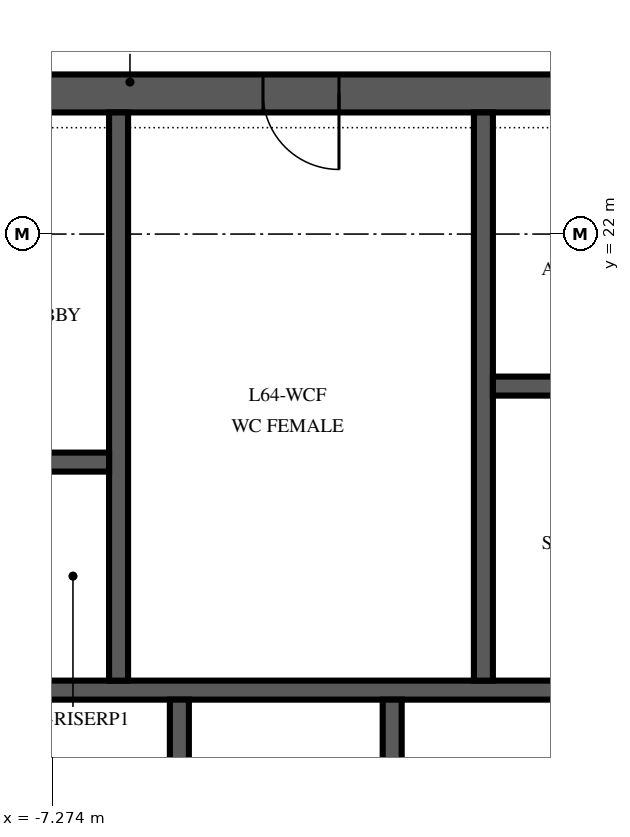
"""IFC4 building model, lengths in metres.
Left out: names, types, materials, properties, quantities, classifications, styles, units other than length and angle.
Written with IfcOpenShell. Run it as: python <this file> out.ifc"""

import sys

from ifc_helpers import new_model, si_unit, direction, frame, frame_2d, origin, place, context, subcontext, project, spatial, rectangle, extrude, element, fill, save


model = new_model("IFC4")
c1 = context("Model", 3, precision=1e-05, world=origin(), true_north=direction((0.0, 1.0)))
c2 = subcontext(c1, "Body", "Model", "MODEL_VIEW")
j1 = project(units=[si_unit("LENGTHUNIT", "METRE"), si_unit("PLANEANGLEUNIT", "RADIAN")], contexts=[c1])
p1 = place(None, origin())
s1 = spatial("IfcSite", under=j1, at=p1, CompositionType="ELEMENT")
p2 = place(p1, origin())
s2 = spatial("IfcBuilding", under=s1, at=p2, CompositionType="ELEMENT")
p3 = place(p2, frame((0.0, 0.0, 276.0)))
s3 = spatial("IfcBuildingStorey", under=s2, at=p3, CompositionType="ELEMENT", Elevation=276.0)
p4 = place(p3, frame((13.85, 23.85, 0.0), z_axis=(0.0, 0.0, 1.0), x_axis=(-1.0, 0.0, 0.0)))
e1 = element("IfcWall", 1, at=p4, inside=s3, PredefinedType="SHEAR", context=c2, shape_type="SweptSolid", body=[
    extrude(rectangle(XDim=27.7, YDim=0.5, at=frame_2d((13.85, 0.0))), origin(), (0.0, 0.0, 1.0), 4.0),
])
p5 = place(p4, frame((21.75, 0.0, 0.0)))
e2 = element("IfcOpeningElement", 2, at=p5, cuts=e1, PredefinedType="OPENING", context=c2, shape_type="SweptSolid", body=[
    extrude(rectangle(XDim=1.0, YDim=2.1, at=frame_2d((0.5, 1.05))), frame((0.0, 0.265, 0.0), z_axis=(0.0, -1.0, 0.0), x_axis=(1.0, 0.0, 0.0)), (0.0, 0.0, 1.0), 0.53),
])
p6 = place(p4, frame((4.95, 0.0, 0.0)))
e3 = element("IfcOpeningElement", 3, at=p6, cuts=e1, PredefinedType="OPENING", context=c2, shape_type="SweptSolid", body=[
    extrude(rectangle(XDim=1.0, YDim=2.1, at=frame_2d((0.5, 1.05))), frame((0.0, 0.265, 0.0), z_axis=(0.0, -1.0, 0.0), x_axis=(1.0, 0.0, 0.0)), (0.0, 0.0, 1.0), 0.53),
])
p7 = place(p4, frame((17.35, 0.0, 0.0)))
e4 = element("IfcOpeningElement", 4, at=p7, cuts=e1, PredefinedType="OPENING", context=c2, shape_type="SweptSolid", body=[
    extrude(rectangle(XDim=1.0, YDim=2.1, at=frame_2d((0.5, 1.05))), frame((0.0, 0.265, 0.0), z_axis=(0.0, -1.0, 0.0), x_axis=(1.0, 0.0, 0.0)), (0.0, 0.0, 1.0), 0.53),
])
p8 = place(p4, frame((13.35, 0.0, 0.0)))
e5 = element("IfcOpeningElement", 5, at=p8, cuts=e1, PredefinedType="OPENING", context=c2, shape_type="SweptSolid", body=[
    extrude(rectangle(XDim=1.0, YDim=2.1, at=frame_2d((0.5, 1.05))), frame((0.0, 0.265, 0.0), z_axis=(0.0, -1.0, 0.0), x_axis=(1.0, 0.0, 0.0)), (0.0, 0.0, 1.0), 0.53),
])
p9 = place(p4, frame((9.35, 0.0, 0.0)))
e6 = element("IfcOpeningElement", 6, at=p9, cuts=e1, PredefinedType="OPENING", context=c2, shape_type="SweptSolid", body=[
    extrude(rectangle(XDim=1.0, YDim=2.1, at=frame_2d((0.5, 1.05))), frame((0.0, 0.265, 0.0), z_axis=(0.0, -1.0, 0.0), x_axis=(1.0, 0.0, 0.0)), (0.0, 0.0, 1.0), 0.53),
])
p10 = place(p3, frame((-13.6, 16.0, 0.0), z_axis=(0.0, 0.0, 1.0), x_axis=(1.0, 0.0, 0.0)))
e7 = element("IfcWall", 7, at=p10, inside=s3, PredefinedType="SHEAR", context=c2, shape_type="SweptSolid", body=[
    extrude(rectangle(XDim=27.2, YDim=0.25, at=frame_2d((13.6, 0.0))), origin(), (0.0, 0.0, 1.0), 4.0),
])
for number, where, z_axis, x_axis in (
    (8, (-5.6, 13.125, 0.0), (0.0, 0.0, 1.0), (0.0, 1.0, 0.0)),
    (9, (-2.8, 13.125, 0.0), (0.0, 0.0, 1.0), (0.0, 1.0, 0.0)),
):
    element("IfcWall", number, at=place(p3, frame(where, z_axis=z_axis, x_axis=x_axis)), inside=s3, PredefinedType="SHEAR", context=c2, shape_type="SweptSolid", body=[
        extrude(rectangle(XDim=2.75, YDim=0.25, at=frame_2d((1.375, 0.0))), origin(), (0.0, 0.0, 1.0), 4.0),
    ])
for number, where, z_axis, x_axis in (
    (10, (-6.4, 16.125, 0.0), (0.0, 0.0, 1.0), (0.0, 1.0, 0.0)),
    (11, (-1.6, 16.125, 0.0), (0.0, 0.0, 1.0), (0.0, 1.0, 0.0)),
):
    element("IfcWall", number, at=place(p3, frame(where, z_axis=z_axis, x_axis=x_axis)), inside=s3, PredefinedType="SHEAR", context=c2, shape_type="SweptSolid", body=[
        extrude(rectangle(XDim=7.475, YDim=0.25, at=frame_2d((3.738, 0.0))), origin(), (0.0, 0.0, 1.0), 4.0),
    ])
p11 = place(p3, frame((-10.275, 19.0, 0.0), z_axis=(0.0, 0.0, 1.0), x_axis=(1.0, 0.0, 0.0)))
e12 = element("IfcWall", 12, at=p11, inside=s3, PredefinedType="SHEAR", context=c2, shape_type="SweptSolid", body=[
    extrude(rectangle(XDim=3.75, YDim=0.25, at=frame_2d((1.875, 0.0))), origin(), (0.0, 0.0, 1.0), 4.0),
])
p12 = place(p11, frame((0.725, 0.0, 0.0)))
e13 = element("IfcOpeningElement", 13, at=p12, cuts=e12, PredefinedType="OPENING", context=c2, shape_type="SweptSolid", body=[
    extrude(rectangle(XDim=1.1, YDim=2.1, at=frame_2d((0.55, 1.05))), frame((0.0, 0.14, 0.0), z_axis=(0.0, -1.0, 0.0), x_axis=(1.0, 0.0, 0.0)), (0.0, 0.0, 1.0), 0.28),
])
p13 = place(p3, frame((-1.475, 20.0, 0.0), z_axis=(0.0, 0.0, 1.0), x_axis=(1.0, 0.0, 0.0)))
e14 = element("IfcWall", 14, at=p13, inside=s3, PredefinedType="SHEAR", context=c2, shape_type="SweptSolid", body=[
    extrude(rectangle(XDim=2.95, YDim=0.25, at=frame_2d((1.475, 0.0))), origin(), (0.0, 0.0, 1.0), 4.0),
])
p14 = place(p7, origin())
e15 = element("IfcDoor", 15, at=p14, inside=s3, OperationType="SINGLE_SWING_LEFT", PredefinedType="DOOR", context=c2, shape_type="SweptSolid", body=[
    extrude(rectangle(XDim=1.0, YDim=2.1, at=frame_2d((0.5, 1.05))), frame((0.0, 0.25, 0.0), z_axis=(0.0, -1.0, 0.0), x_axis=(1.0, 0.0, 0.0)), (0.0, 0.0, 1.0), 0.5),
])
fill(e4, e15)
save(model, sys.argv[1])
